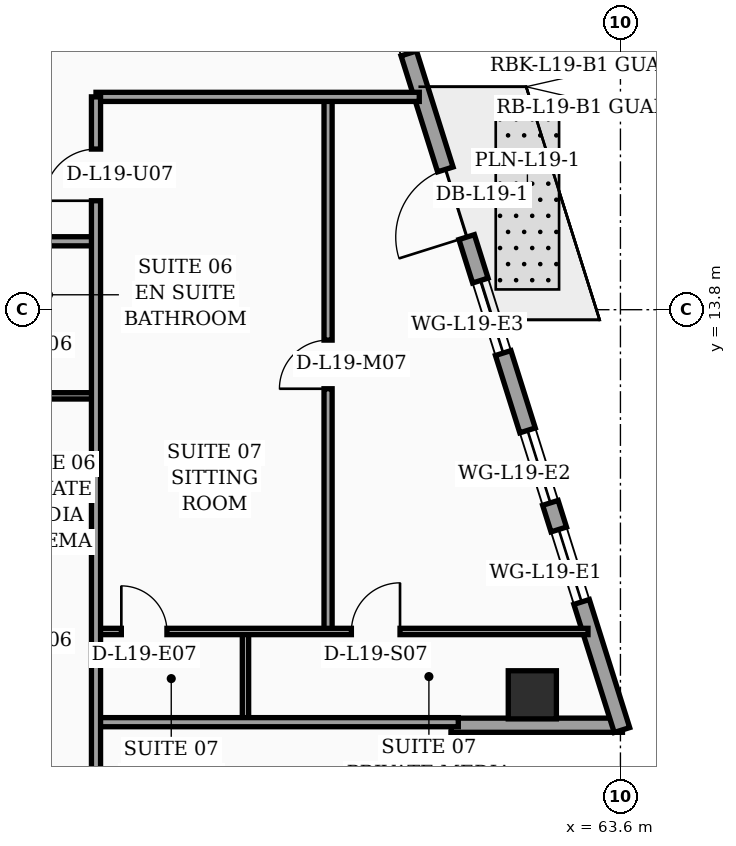
"""IFC4 building model, lengths in metres.
Left out: names, types, materials, properties, quantities, classifications, styles, units other than length and angle.
Written with IfcOpenShell. Run it as: python <this file> out.ifc"""

import sys

from ifc_helpers import new_model, si_unit, direction, frame, frame_2d, origin, origin_2d, place, context, subcontext, project, spatial, rectangle, hollow_rectangle, extrude, element, fill, save


model = new_model("IFC4")
c1 = context("Model", 3, precision=1e-05, world=origin(), true_north=direction((0.0, 1.0)))
c2 = subcontext(c1, "Body", "Model", "MODEL_VIEW")
j1 = project(units=[si_unit("LENGTHUNIT", "METRE"), si_unit("PLANEANGLEUNIT", "RADIAN")], contexts=[c1])
p1 = place(None, origin())
s1 = spatial("IfcSite", under=j1, at=p1, CompositionType="ELEMENT")
p2 = place(p1, origin())
s2 = spatial("IfcBuilding", under=s1, at=p2, CompositionType="ELEMENT")
p3 = place(p2, frame((0.0, 0.0, 81.2)))
s3 = spatial("IfcBuildingStorey", under=s2, at=p3, CompositionType="ELEMENT", Elevation=81.2)
p4 = place(p3, frame((61.861, 6.2, 0.0), z_axis=(0.0, 0.0, 1.0), x_axis=(1.0, 0.0, 0.0)))
e1 = element("IfcColumn", 1, at=p4, inside=s3, PredefinedType="COLUMN", context=c2, shape_type="SweptSolid", body=[
    extrude(hollow_rectangle(XDim=0.95, YDim=0.95, WallThickness=0.04, at=origin_2d()), origin(), (0.0, 0.0, 1.0), 3.56),
])
p5 = place(p3, frame((60.4, 2.52, 0.0), z_axis=(0.0, 0.0, 1.0), x_axis=(0.0, 1.0, 0.0)))
e2 = element("IfcWall", 2, at=p5, inside=s3, PredefinedType="SOLIDWALL", context=c2, shape_type="SweptSolid", body=[
    extrude(rectangle(XDim=2.94, YDim=0.28, at=frame_2d((1.47, 0.0))), origin(), (0.0, 0.0, 1.0), 3.04),
])
p6 = place(p3, frame((60.26, 5.6, 0.0), z_axis=(0.0, 0.0, 1.0), x_axis=(1.0, 0.0, 0.0)))
e3 = element("IfcWall", 3, at=p6, inside=s3, PredefinedType="SOLIDWALL", context=c2, shape_type="SweptSolid", body=[
    extrude(rectangle(XDim=3.38, YDim=0.28, at=frame_2d((1.69, 0.0))), origin(), (0.0, 0.0, 1.0), 3.04),
])
p7 = place(p3, frame((63.63, 5.505, 0.0), z_axis=(0.0, 0.0, 1.0), x_axis=(-0.300501856448, 0.953781229775, 0.0)))
e4 = element("IfcWall", 4, at=p7, inside=s3, PredefinedType="SOLIDWALL", context=c2, shape_type="SweptSolid", body=[
    extrude(rectangle(XDim=30.814, YDim=0.32, at=frame_2d((15.407, 0.0))), origin(), (0.0, 0.0, 1.0), 3.56),
])
p8 = place(p7, frame((10.199, 0.0, 0.0)))
e5 = element("IfcOpeningElement", 5, at=p8, cuts=e4, PredefinedType="OPENING", context=c2, shape_type="SweptSolid", body=[
    extrude(rectangle(XDim=1.4, YDim=2.25, at=frame_2d((0.7, 1.125))), frame((0.0, 0.17, 0.0), z_axis=(0.0, -1.0, 0.0), x_axis=(1.0, 0.0, 0.0)), (0.0, 0.0, 1.0), 0.34),
])
p9 = place(p7, frame((2.65, 0.0, 0.75)))
e6 = element("IfcOpeningElement", 6, at=p9, cuts=e4, PredefinedType="OPENING", context=c2, shape_type="SweptSolid", body=[
    extrude(rectangle(XDim=1.5, YDim=1.6, at=frame_2d((0.75, 0.8))), frame((0.0, 0.17, 0.0), z_axis=(0.0, -1.0, 0.0), x_axis=(1.0, 0.0, 0.0)), (0.0, 0.0, 1.0), 0.34),
])
p10 = place(p7, frame((4.7, 0.0, 0.75)))
e7 = element("IfcOpeningElement", 7, at=p10, cuts=e4, PredefinedType="OPENING", context=c2, shape_type="SweptSolid", body=[
    extrude(rectangle(XDim=1.5, YDim=1.6, at=frame_2d((0.75, 0.8))), frame((0.0, 0.17, 0.0), z_axis=(0.0, -1.0, 0.0), x_axis=(1.0, 0.0, 0.0)), (0.0, 0.0, 1.0), 0.34),
])
p11 = place(p7, frame((7.8, 0.0, 0.75)))
e8 = element("IfcOpeningElement", 8, at=p11, cuts=e4, PredefinedType="OPENING", context=c2, shape_type="SweptSolid", body=[
    extrude(rectangle(XDim=1.5, YDim=1.6, at=frame_2d((0.75, 0.8))), frame((0.0, 0.17, 0.0), z_axis=(0.0, -1.0, 0.0), x_axis=(1.0, 0.0, 0.0)), (0.0, 0.0, 1.0), 0.34),
])
p12 = place(p7, frame((14.0, 0.0, 0.75)))
e9 = element("IfcOpeningElement", 9, at=p12, cuts=e4, PredefinedType="OPENING", context=c2, shape_type="SweptSolid", body=[
    extrude(rectangle(XDim=1.5, YDim=1.6, at=frame_2d((0.75, 0.8))), frame((0.0, 0.17, 0.0), z_axis=(0.0, -1.0, 0.0), x_axis=(1.0, 0.0, 0.0)), (0.0, 0.0, 1.0), 0.34),
])
p13 = place(p7, frame((17.1, 0.0, 0.75)))
e10 = element("IfcOpeningElement", 10, at=p13, cuts=e4, PredefinedType="OPENING", context=c2, shape_type="SweptSolid", body=[
    extrude(rectangle(XDim=1.5, YDim=1.6, at=frame_2d((0.75, 0.8))), frame((0.0, 0.17, 0.0), z_axis=(0.0, -1.0, 0.0), x_axis=(1.0, 0.0, 0.0)), (0.0, 0.0, 1.0), 0.34),
])
p14 = place(p7, frame((20.2, 0.0, 0.75)))
e11 = element("IfcOpeningElement", 11, at=p14, cuts=e4, PredefinedType="OPENING", context=c2, shape_type="SweptSolid", body=[
    extrude(rectangle(XDim=1.5, YDim=1.6, at=frame_2d((0.75, 0.8))), frame((0.0, 0.17, 0.0), z_axis=(0.0, -1.0, 0.0), x_axis=(1.0, 0.0, 0.0)), (0.0, 0.0, 1.0), 0.34),
])
p15 = place(p7, frame((23.3, 0.0, 0.75)))
e12 = element("IfcOpeningElement", 12, at=p15, cuts=e4, PredefinedType="OPENING", context=c2, shape_type="SweptSolid", body=[
    extrude(rectangle(XDim=1.5, YDim=1.6, at=frame_2d((0.75, 0.8))), frame((0.0, 0.17, 0.0), z_axis=(0.0, -1.0, 0.0), x_axis=(1.0, 0.0, 0.0)), (0.0, 0.0, 1.0), 0.34),
])
p16 = place(p7, frame((26.4, 0.0, 0.75)))
e13 = element("IfcOpeningElement", 13, at=p16, cuts=e4, PredefinedType="OPENING", context=c2, shape_type="SweptSolid", body=[
    extrude(rectangle(XDim=1.5, YDim=1.6, at=frame_2d((0.75, 0.8))), frame((0.0, 0.17, 0.0), z_axis=(0.0, -1.0, 0.0), x_axis=(1.0, 0.0, 0.0)), (0.0, 0.0, 1.0), 0.34),
])
p17 = place(p3, frame((51.29, 12.1, 0.0), z_axis=(0.0, 0.0, 1.0), x_axis=(1.0, 0.0, 0.0)))
e14 = element("IfcWall", 14, at=p17, inside=s3, PredefinedType="PARTITIONING", context=c2, shape_type="SweptSolid", body=[
    extrude(rectangle(XDim=1.96, YDim=0.125, at=frame_2d((0.98, 0.0))), origin(), (0.0, 0.0, 1.0), 3.56),
])
p18 = place(p3, frame((32.4, 15.15, 0.0), z_axis=(0.0, 0.0, 1.0), x_axis=(1.0, 0.0, 0.0)))
e15 = element("IfcWall", 15, at=p18, inside=s3, PredefinedType="PARTITIONING", context=c2, shape_type="SweptSolid", body=[
    extrude(rectangle(XDim=20.85, YDim=0.18, at=frame_2d((10.425, 0.0))), origin(), (0.0, 0.0, 1.0), 2.84),
])
p19 = place(p18, frame((1.1, 0.0, 0.0)))
e16 = element("IfcOpeningElement", 16, at=p19, cuts=e15, PredefinedType="OPENING", context=c2, shape_type="SweptSolid", body=[
    extrude(rectangle(XDim=1.5, YDim=2.22, at=frame_2d((0.75, 1.11))), frame((0.0, 0.1, 0.0), z_axis=(0.0, -1.0, 0.0), x_axis=(1.0, 0.0, 0.0)), (0.0, 0.0, 1.0), 0.2),
])
p20 = place(p18, frame((9.94, 0.0, 0.0)))
e17 = element("IfcOpeningElement", 17, at=p20, cuts=e15, PredefinedType="OPENING", context=c2, shape_type="SweptSolid", body=[
    extrude(rectangle(XDim=1.02, YDim=2.2, at=frame_2d((0.51, 1.1))), frame((0.0, 0.1, 0.0), z_axis=(0.0, -1.0, 0.0), x_axis=(1.0, 0.0, 0.0)), (0.0, 0.0, 1.0), 0.2),
])
p21 = place(p18, frame((15.92, 0.0, 0.0)))
e18 = element("IfcOpeningElement", 18, at=p21, cuts=e15, PredefinedType="OPENING", context=c2, shape_type="SweptSolid", body=[
    extrude(rectangle(XDim=1.02, YDim=2.2, at=frame_2d((0.51, 1.1))), frame((0.0, 0.1, 0.0), z_axis=(0.0, -1.0, 0.0), x_axis=(1.0, 0.0, 0.0)), (0.0, 0.0, 1.0), 0.2),
])
p22 = place(p3, frame((56.2, 5.66, 0.0), z_axis=(0.0, 0.0, 1.0), x_axis=(0.0, 1.0, 0.0)))
e19 = element("IfcWall", 19, at=p22, inside=s3, PredefinedType="PARTITIONING", context=c2, shape_type="SweptSolid", body=[
    extrude(rectangle(XDim=1.79, YDim=0.125, at=frame_2d((0.895, 0.0))), origin(), (0.0, 0.0, 1.0), 3.56),
])
p23 = place(p3, frame((57.83, 7.45, 0.0), z_axis=(0.0, 0.0, 1.0), x_axis=(0.0, 1.0, 0.0)))
e20 = element("IfcWall", 20, at=p23, inside=s3, PredefinedType="PARTITIONING", context=c2, shape_type="SweptSolid", body=[
    extrude(rectangle(XDim=10.55, YDim=0.16, at=frame_2d((5.275, 0.0))), origin(), (0.0, 0.0, 1.0), 3.04),
])
p24 = place(p23, frame((4.79, 0.0, 0.0)))
e21 = element("IfcOpeningElement", 21, at=p24, cuts=e20, PredefinedType="OPENING", context=c2, shape_type="SweptSolid", body=[
    extrude(rectangle(XDim=0.96, YDim=2.2, at=frame_2d((0.48, 1.1))), frame((0.0, 0.09, 0.0), z_axis=(0.0, -1.0, 0.0), x_axis=(1.0, 0.0, 0.0)), (0.0, 0.0, 1.0), 0.18),
])
p25 = place(p3, frame((53.25, 7.45, 0.0), z_axis=(0.0, 0.0, 1.0), x_axis=(1.0, 0.0, 0.0)))
e22 = element("IfcWall", 22, at=p25, inside=s3, PredefinedType="PARTITIONING", context=c2, shape_type="SweptSolid", body=[
    extrude(rectangle(XDim=9.71, YDim=0.125, at=frame_2d((4.855, 0.0))), origin(), (0.0, 0.0, 1.0), 3.04),
])
p26 = place(p25, frame((0.5, 0.0, 0.0)))
e23 = element("IfcOpeningElement", 23, at=p26, cuts=e22, PredefinedType="OPENING", context=c2, shape_type="SweptSolid", body=[
    extrude(rectangle(XDim=0.9, YDim=2.15, at=frame_2d((0.45, 1.075))), frame((0.0, 0.073, 0.0), z_axis=(0.0, -1.0, 0.0), x_axis=(1.0, 0.0, 0.0)), (0.0, 0.0, 1.0), 0.145),
])
p27 = place(p25, frame((5.04, 0.0, 0.0)))
e24 = element("IfcOpeningElement", 24, at=p27, cuts=e22, PredefinedType="OPENING", context=c2, shape_type="SweptSolid", body=[
    extrude(rectangle(XDim=0.96, YDim=2.2, at=frame_2d((0.48, 1.1))), frame((0.0, 0.073, 0.0), z_axis=(0.0, -1.0, 0.0), x_axis=(1.0, 0.0, 0.0)), (0.0, 0.0, 1.0), 0.145),
])
p28 = place(p3, frame((53.25, 5.66, 0.0), z_axis=(0.0, 0.0, 1.0), x_axis=(1.0, 0.0, 0.0)))
e25 = element("IfcWall", 25, at=p28, inside=s3, PredefinedType="PARTITIONING", context=c2, shape_type="SweptSolid", body=[
    extrude(rectangle(XDim=7.15, YDim=0.18, at=frame_2d((3.575, 0.0))), origin(), (0.0, 0.0, 1.0), 3.04),
])
p29 = place(p3, frame((53.25, 18.0, 0.0), z_axis=(0.0, 0.0, 1.0), x_axis=(1.0, 0.0, 0.0)))
e26 = element("IfcWall", 26, at=p29, inside=s3, PredefinedType="PARTITIONING", context=c2, shape_type="SweptSolid", body=[
    extrude(rectangle(XDim=6.38, YDim=0.18, at=frame_2d((3.19, 0.0))), origin(), (0.0, 0.0, 1.0), 3.04),
])
p30 = place(p3, frame((53.25, 2.44, 0.0), z_axis=(0.0, 0.0, 1.0), x_axis=(0.0, 1.0, 0.0)))
e27 = element("IfcWall", 27, at=p30, inside=s3, PredefinedType="PARTITIONING", context=c2, shape_type="SweptSolid", body=[
    extrude(rectangle(XDim=15.56, YDim=0.18, at=frame_2d((7.78, 0.0))), origin(), (0.0, 0.0, 1.0), 3.04),
])
p31 = place(p30, frame((13.51, 0.0, 0.0)))
e28 = element("IfcOpeningElement", 28, at=p31, cuts=e27, PredefinedType="OPENING", context=c2, shape_type="SweptSolid", body=[
    extrude(rectangle(XDim=1.02, YDim=2.2, at=frame_2d((0.51, 1.1))), frame((0.0, 0.1, 0.0), z_axis=(0.0, -1.0, 0.0), x_axis=(1.0, 0.0, 0.0)), (0.0, 0.0, 1.0), 0.2),
])
p32 = place(p8, origin())
e29 = element("IfcDoor", 29, at=p32, inside=s3, OperationType="SINGLE_SWING_LEFT", PredefinedType="DOOR", context=c2, shape_type="SweptSolid", body=[
    extrude(rectangle(XDim=1.4, YDim=2.25, at=frame_2d((0.7, 1.125))), frame((0.0, 0.025, 0.0), z_axis=(0.0, -1.0, 0.0), x_axis=(1.0, 0.0, 0.0)), (0.0, 0.0, 1.0), 0.05),
])
fill(e5, e29)
p33 = place(p9, origin())
e30 = element("IfcWindow", 30, at=p33, inside=s3, PartitioningType="SINGLE_PANEL", PredefinedType="WINDOW", context=c2, shape_type="SweptSolid", body=[
    extrude(rectangle(XDim=1.5, YDim=1.6, at=frame_2d((0.75, 0.8))), frame((0.0, 0.03, 0.0), z_axis=(0.0, -1.0, 0.0), x_axis=(1.0, 0.0, 0.0)), (0.0, 0.0, 1.0), 0.06),
])
fill(e6, e30)
p34 = place(p10, origin())
e31 = element("IfcWindow", 31, at=p34, inside=s3, PartitioningType="SINGLE_PANEL", PredefinedType="WINDOW", context=c2, shape_type="SweptSolid", body=[
    extrude(rectangle(XDim=1.5, YDim=1.6, at=frame_2d((0.75, 0.8))), frame((0.0, 0.03, 0.0), z_axis=(0.0, -1.0, 0.0), x_axis=(1.0, 0.0, 0.0)), (0.0, 0.0, 1.0), 0.06),
])
fill(e7, e31)
p35 = place(p11, origin())
e32 = element("IfcWindow", 32, at=p35, inside=s3, PartitioningType="SINGLE_PANEL", PredefinedType="WINDOW", context=c2, shape_type="SweptSolid", body=[
    extrude(rectangle(XDim=1.5, YDim=1.6, at=frame_2d((0.75, 0.8))), frame((0.0, 0.03, 0.0), z_axis=(0.0, -1.0, 0.0), x_axis=(1.0, 0.0, 0.0)), (0.0, 0.0, 1.0), 0.06),
])
fill(e8, e32)
p36 = place(p12, origin())
e33 = element("IfcWindow", 33, at=p36, inside=s3, PartitioningType="SINGLE_PANEL", PredefinedType="WINDOW", context=c2, shape_type="SweptSolid", body=[
    extrude(rectangle(XDim=1.5, YDim=1.6, at=frame_2d((0.75, 0.8))), frame((0.0, 0.03, 0.0), z_axis=(0.0, -1.0, 0.0), x_axis=(1.0, 0.0, 0.0)), (0.0, 0.0, 1.0), 0.06),
])
fill(e9, e33)
p37 = place(p24, origin())
e34 = element("IfcDoor", 34, at=p37, inside=s3, OperationType="SINGLE_SWING_LEFT", PredefinedType="DOOR", context=c2, shape_type="SweptSolid", body=[
    extrude(rectangle(XDim=0.96, YDim=2.2, at=frame_2d((0.48, 1.1))), frame((0.0, 0.025, 0.0), z_axis=(0.0, -1.0, 0.0), x_axis=(1.0, 0.0, 0.0)), (0.0, 0.0, 1.0), 0.05),
])
fill(e21, e34)
p38 = place(p26, origin())
e35 = element("IfcDoor", 35, at=p38, inside=s3, OperationType="SINGLE_SWING_LEFT", PredefinedType="DOOR", context=c2, shape_type="SweptSolid", body=[
    extrude(rectangle(XDim=0.9, YDim=2.15, at=frame_2d((0.45, 1.075))), frame((0.0, 0.025, 0.0), z_axis=(0.0, -1.0, 0.0), x_axis=(1.0, 0.0, 0.0)), (0.0, 0.0, 1.0), 0.05),
])
fill(e23, e35)
p39 = place(p27, origin())
e36 = element("IfcDoor", 36, at=p39, inside=s3, OperationType="SINGLE_SWING_RIGHT", PredefinedType="DOOR", context=c2, shape_type="SweptSolid", body=[
    extrude(rectangle(XDim=0.96, YDim=2.2, at=frame_2d((0.48, 1.1))), frame((0.0, 0.025, 0.0), z_axis=(0.0, -1.0, 0.0), x_axis=(1.0, 0.0, 0.0)), (0.0, 0.0, 1.0), 0.05),
])
fill(e24, e36)
p40 = place(p31, origin())
e37 = element("IfcDoor", 37, at=p40, inside=s3, OperationType="SINGLE_SWING_LEFT", PredefinedType="DOOR", context=c2, shape_type="SweptSolid", body=[
    extrude(rectangle(XDim=1.02, YDim=2.2, at=frame_2d((0.51, 1.1))), frame((0.0, 0.025, 0.0), z_axis=(0.0, -1.0, 0.0), x_axis=(1.0, 0.0, 0.0)), (0.0, 0.0, 1.0), 0.05),
])
fill(e28, e37)
save(model, sys.argv[1])
